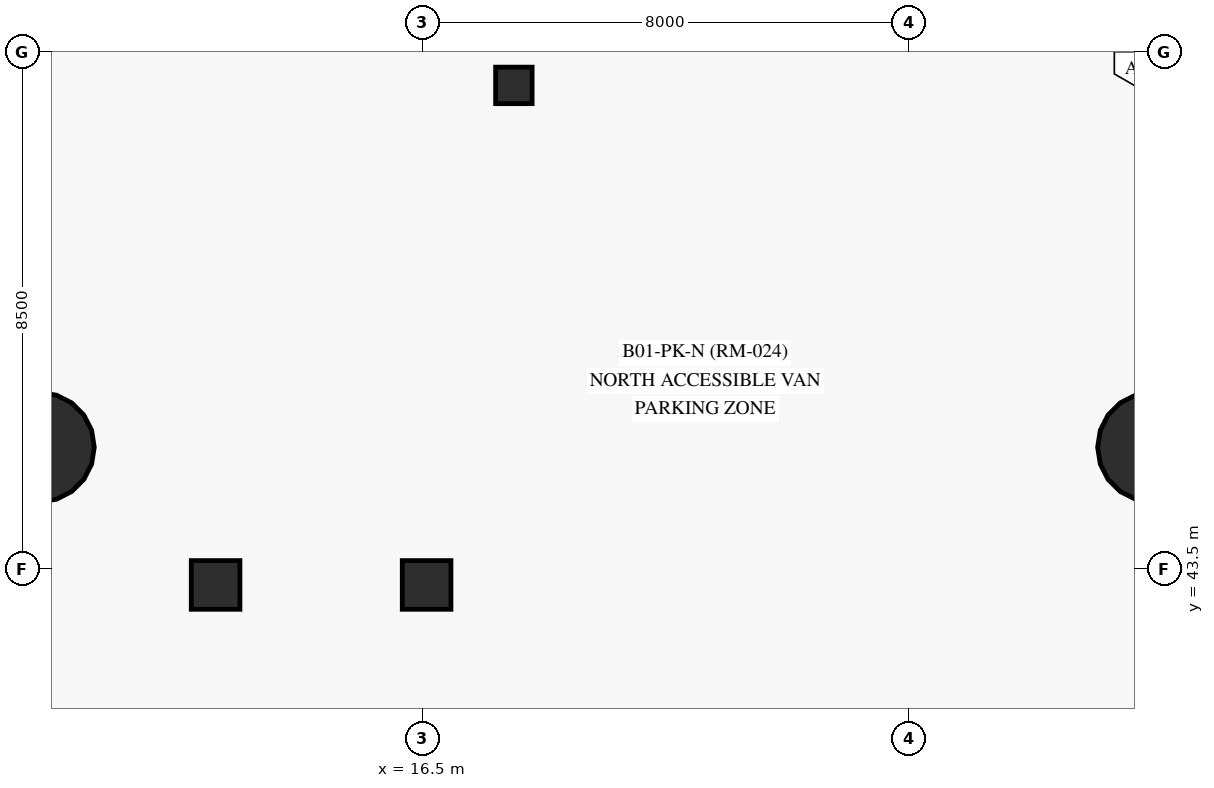
"""IFC4 building model, lengths in metres.
Left out: names, types, materials, properties, quantities, classifications, styles, units other than length and angle.
Written with IfcOpenShell. Run it as: python <this file> out.ifc"""

import sys

from ifc_helpers import new_model, si_unit, direction, frame, origin, origin_with_axes, origin_2d, place, context, subcontext, project, spatial, rectangle, circle, extrude, source, transform, mapped, element, save


model = new_model("IFC4")
c1 = context("Model", 3, precision=1e-05, world=origin(), true_north=direction((0.0, 1.0)))
c2 = subcontext(c1, "Body", "Model", "MODEL_VIEW")
j1 = project(units=[si_unit("LENGTHUNIT", "METRE"), si_unit("PLANEANGLEUNIT", "RADIAN")], contexts=[c1])
p1 = place(None, origin())
s1 = spatial("IfcSite", under=j1, at=p1, CompositionType="ELEMENT")
p2 = place(p1, origin())
s2 = spatial("IfcBuilding", under=s1, at=p2, CompositionType="ELEMENT")
p3 = place(p2, frame((0.0, 0.0, -4.2)))
s3 = spatial("IfcBuildingStorey", under=s2, at=p3, CompositionType="ELEMENT", Elevation=-4.2)
m1 = source(origin_with_axes(), c2, "Body", "SweptSolid", [
    extrude(rectangle(XDim=0.8, YDim=0.8, at=origin_2d()), origin(), (0.0, 0.0, 1.0), 4.2),
])
for number, where, z_axis, x_axis in (
    (1, (13.095, 43.235, 0.0), (0.0, 0.0, 1.0), (1.0, 0.0, 0.0)),
    (2, (16.565, 43.235, 0.0), (0.0, 0.0, 1.0), (1.0, 0.0, 0.0)),
):
    element("IfcColumn", number, at=place(p3, frame(where, z_axis=z_axis, x_axis=x_axis)), inside=s3, PredefinedType="COLUMN", context=c2, shape_type="MappedRepresentation", body=[
        mapped(m1, transform((0.0, 0.0, 0.0), scale=1.0)),
    ])
m2 = source(origin_with_axes(), c2, "Body", "SweptSolid", [
    extrude(rectangle(XDim=0.6, YDim=0.6, at=origin_2d()), origin(), (0.0, 0.0, 1.0), 4.2),
])
p4 = place(p3, frame((18.0, 51.45, 0.0), z_axis=(0.0, 0.0, 1.0), x_axis=(1.0, 0.0, 0.0)))
e3 = element("IfcColumn", 3, at=p4, inside=s3, PredefinedType="COLUMN", context=c2, shape_type="MappedRepresentation", body=[
    mapped(m2, transform((0.0, 0.0, 0.0), scale=1.0)),
])
m3 = source(origin_with_axes(), c2, "Body", "SweptSolid", [
    extrude(circle(Radius=0.9, at=origin_2d()), origin(), (0.0, 0.0, 1.0), 4.2),
])
for number, where, z_axis, x_axis in (
    (4, (10.2, 45.5, 0.0), (0.0, 0.0, 1.0), (1.0, 0.0, 0.0)),
    (5, (28.5, 45.5, 0.0), (0.0, 0.0, 1.0), (1.0, 0.0, 0.0)),
):
    element("IfcColumn", number, at=place(p3, frame(where, z_axis=z_axis, x_axis=x_axis)), inside=s3, PredefinedType="COLUMN", context=c2, shape_type="MappedRepresentation", body=[
        mapped(m3, transform((0.0, 0.0, 0.0), scale=1.0)),
    ])
save(model, sys.argv[1])
